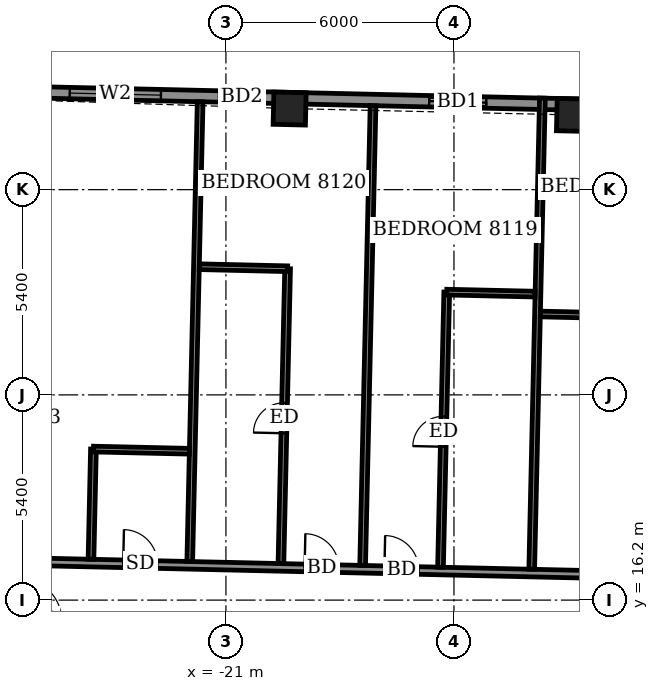
"""IFC4 building model, lengths in metres.
Left out: names, types, materials, properties, quantities, classifications, styles, units other than length and angle.
Written with IfcOpenShell. Run it as: python <this file> out.ifc"""

import sys

from ifc_helpers import new_model, si_unit, direction, frame, frame_2d, origin, origin_2d, place, context, subcontext, project, spatial, rectangle, extrude, element, fill, save


model = new_model("IFC4")
c1 = context("Model", 3, precision=1e-05, world=origin(), true_north=direction((0.0, 1.0)))
c2 = subcontext(c1, "Body", "Model", "MODEL_VIEW")
j1 = project(units=[si_unit("LENGTHUNIT", "METRE"), si_unit("PLANEANGLEUNIT", "RADIAN")], contexts=[c1])
p1 = place(None, origin())
s1 = spatial("IfcSite", under=j1, at=p1, CompositionType="ELEMENT")
p2 = place(p1, origin())
s2 = spatial("IfcBuilding", under=s1, at=p2, CompositionType="ELEMENT")
p3 = place(p2, frame((0.0, 0.0, 316.9)))
s3 = spatial("IfcBuildingStorey", under=s2, at=p3, CompositionType="ELEMENT", Elevation=316.9)
for number, where, z_axis, x_axis in (
    (1, (-11.869, 28.965, -0.55), (0.0, 0.0, 1.0), (-1.0, 0.023, 0.0)),
    (2, (-19.324, 29.134, -0.55), (0.0, 0.0, 1.0), (-1.0, 0.023, 0.0)),
):
    element("IfcColumn", number, at=place(p3, frame(where, z_axis=z_axis, x_axis=x_axis)), inside=s3, PredefinedType="COLUMN", context=c2, shape_type="SweptSolid", body=[
        extrude(rectangle(XDim=0.85, YDim=0.85, at=origin_2d()), origin(), (0.0, 0.0, 1.0), 3.6),
    ])
p4 = place(p3, frame((25.264, 28.397, 0.0), z_axis=(0.0, 0.0, 1.0), x_axis=(-0.999742391375, 0.022696935658, 0.0)))
e3 = element("IfcWall", 3, at=p4, inside=s3, PredefinedType="SOLIDWALL", context=c2, shape_type="SweptSolid", body=[
    extrude(rectangle(XDim=51.9, YDim=0.3, at=frame_2d((25.95, 0.0))), origin(), (0.0, 0.0, 1.0), 2.45),
])
p5 = place(p4, frame((0.874, 0.0, 0.0)))
e4 = element("IfcOpeningElement", 4, at=p5, cuts=e3, PredefinedType="OPENING", context=c2, shape_type="SweptSolid", body=[
    extrude(rectangle(XDim=1.5, YDim=2.4, at=frame_2d((0.75, 1.2))), frame((0.0, 0.16, 0.0), z_axis=(0.0, -1.0, 0.0), x_axis=(1.0, 0.0, 0.0)), (0.0, 0.0, 1.0), 0.32),
])
p6 = place(p4, frame((4.241, 0.0, 0.0)))
e5 = element("IfcOpeningElement", 5, at=p6, cuts=e3, PredefinedType="OPENING", context=c2, shape_type="SweptSolid", body=[
    extrude(rectangle(XDim=1.5, YDim=2.4, at=frame_2d((0.75, 1.2))), frame((0.0, 0.16, 0.0), z_axis=(0.0, -1.0, 0.0), x_axis=(1.0, 0.0, 0.0)), (0.0, 0.0, 1.0), 0.32),
])
p7 = place(p4, frame((8.691, 0.0, 0.0)))
e6 = element("IfcOpeningElement", 6, at=p7, cuts=e3, PredefinedType="OPENING", context=c2, shape_type="SweptSolid", body=[
    extrude(rectangle(XDim=1.5, YDim=2.4, at=frame_2d((0.75, 1.2))), frame((0.0, 0.16, 0.0), z_axis=(0.0, -1.0, 0.0), x_axis=(1.0, 0.0, 0.0)), (0.0, 0.0, 1.0), 0.32),
])
p8 = place(p4, frame((12.245, 0.0, 0.0)))
e7 = element("IfcOpeningElement", 7, at=p8, cuts=e3, PredefinedType="OPENING", context=c2, shape_type="SweptSolid", body=[
    extrude(rectangle(XDim=1.5, YDim=2.4, at=frame_2d((0.75, 1.2))), frame((0.0, 0.16, 0.0), z_axis=(0.0, -1.0, 0.0), x_axis=(1.0, 0.0, 0.0)), (0.0, 0.0, 1.0), 0.32),
])
p9 = place(p4, frame((17.25, 0.0, 0.0)))
e8 = element("IfcOpeningElement", 8, at=p9, cuts=e3, PredefinedType="OPENING", context=c2, shape_type="SweptSolid", body=[
    extrude(rectangle(XDim=1.5, YDim=2.4, at=frame_2d((0.75, 1.2))), frame((0.0, 0.16, 0.0), z_axis=(0.0, -1.0, 0.0), x_axis=(1.0, 0.0, 0.0)), (0.0, 0.0, 1.0), 0.32),
])
p10 = place(p4, frame((22.874, 0.0, 0.0)))
e9 = element("IfcOpeningElement", 9, at=p10, cuts=e3, PredefinedType="OPENING", context=c2, shape_type="SweptSolid", body=[
    extrude(rectangle(XDim=1.2, YDim=2.4, at=frame_2d((0.6, 1.2))), frame((0.0, 0.16, 0.0), z_axis=(0.0, -1.0, 0.0), x_axis=(1.0, 0.0, 0.0)), (0.0, 0.0, 1.0), 0.32),
])
p11 = place(p4, frame((26.1, 0.0, 0.0)))
e10 = element("IfcOpeningElement", 10, at=p11, cuts=e3, PredefinedType="OPENING", context=c2, shape_type="SweptSolid", body=[
    extrude(rectangle(XDim=1.5, YDim=2.4, at=frame_2d((0.75, 1.2))), frame((0.0, 0.16, 0.0), z_axis=(0.0, -1.0, 0.0), x_axis=(1.0, 0.0, 0.0)), (0.0, 0.0, 1.0), 0.32),
])
p12 = place(p4, frame((30.977, 0.0, 0.0)))
e11 = element("IfcOpeningElement", 11, at=p12, cuts=e3, PredefinedType="OPENING", context=c2, shape_type="SweptSolid", body=[
    extrude(rectangle(XDim=1.5, YDim=2.4, at=frame_2d((0.75, 1.2))), frame((0.0, 0.16, 0.0), z_axis=(0.0, -1.0, 0.0), x_axis=(1.0, 0.0, 0.0)), (0.0, 0.0, 1.0), 0.32),
])
p13 = place(p4, frame((34.53, 0.0, 0.0)))
e12 = element("IfcOpeningElement", 12, at=p13, cuts=e3, PredefinedType="OPENING", context=c2, shape_type="SweptSolid", body=[
    extrude(rectangle(XDim=1.5, YDim=2.4, at=frame_2d((0.75, 1.2))), frame((0.0, 0.16, 0.0), z_axis=(0.0, -1.0, 0.0), x_axis=(1.0, 0.0, 0.0)), (0.0, 0.0, 1.0), 0.32),
])
p14 = place(p4, frame((39.425, 0.0, 0.0)))
e13 = element("IfcOpeningElement", 13, at=p14, cuts=e3, PredefinedType="OPENING", context=c2, shape_type="SweptSolid", body=[
    extrude(rectangle(XDim=1.5, YDim=2.4, at=frame_2d((0.75, 1.2))), frame((0.0, 0.16, 0.0), z_axis=(0.0, -1.0, 0.0), x_axis=(1.0, 0.0, 0.0)), (0.0, 0.0, 1.0), 0.32),
])
p15 = place(p4, frame((45.259, 0.0, 0.0)))
e14 = element("IfcOpeningElement", 14, at=p15, cuts=e3, PredefinedType="OPENING", context=c2, shape_type="SweptSolid", body=[
    extrude(rectangle(XDim=1.2, YDim=2.4, at=frame_2d((0.6, 1.2))), frame((0.0, 0.16, 0.0), z_axis=(0.0, -1.0, 0.0), x_axis=(1.0, 0.0, 0.0)), (0.0, 0.0, 1.0), 0.32),
])
p16 = place(p4, frame((47.987, 0.0, 0.9)))
e15 = element("IfcOpeningElement", 15, at=p16, cuts=e3, PredefinedType="OPENING", context=c2, shape_type="SweptSolid", body=[
    extrude(rectangle(XDim=2.4, YDim=1.5, at=frame_2d((1.2, 0.75))), frame((0.0, 0.16, 0.0), z_axis=(0.0, -1.0, 0.0), x_axis=(1.0, 0.0, 0.0)), (0.0, 0.0, 1.0), 0.32),
])
p17 = place(p3, frame((-30.686, 15.814, 0.0), z_axis=(0.0, 0.0, 1.0), x_axis=(0.999742346277, -0.022698921993, 0.0)))
e16 = element("IfcWall", 16, at=p17, inside=s3, PredefinedType="PARTITIONING", context=c2, shape_type="SweptSolid", body=[
    extrude(rectangle(XDim=11.1, YDim=0.2, at=frame_2d((5.55, 0.0))), origin(), (0.0, 0.0, 1.0), 3.05),
])
p18 = place(p17, frame((4.35, 0.0, 0.0)))
e17 = element("IfcOpeningElement", 17, at=p18, cuts=e16, PredefinedType="OPENING", context=c2, shape_type="SweptSolid", body=[
    extrude(rectangle(XDim=1.0, YDim=2.1, at=frame_2d((0.5, 1.05))), frame((0.0, 0.11, 0.0), z_axis=(0.0, -1.0, 0.0), x_axis=(1.0, 0.0, 0.0)), (0.0, 0.0, 1.0), 0.22),
])
p19 = place(p3, frame((-30.652, 17.313, 0.0), z_axis=(0.0, 0.0, 1.0), x_axis=(0.999742623764, -0.02268669719, 0.0)))
e18 = element("IfcWall", 18, at=p19, inside=s3, PredefinedType="PARTITIONING", context=c2, shape_type="SweptSolid", body=[
    extrude(rectangle(XDim=58.8, YDim=0.2, at=frame_2d((29.4, 0.0))), origin(), (0.0, 0.0, 1.0), 3.05),
])
p20 = place(p19, frame((55.698, 0.0, 0.0)))
e19 = element("IfcOpeningElement", 19, at=p20, cuts=e18, PredefinedType="OPENING", context=c2, shape_type="SweptSolid", body=[
    extrude(rectangle(XDim=1.0, YDim=2.1, at=frame_2d((0.5, 1.05))), frame((0.0, 0.11, 0.0), z_axis=(0.0, -1.0, 0.0), x_axis=(1.0, 0.0, 0.0)), (0.0, 0.0, 1.0), 0.22),
])
p21 = place(p19, frame((49.0, 0.0, 0.0)))
e20 = element("IfcOpeningElement", 20, at=p21, cuts=e18, PredefinedType="OPENING", context=c2, shape_type="SweptSolid", body=[
    extrude(rectangle(XDim=0.9, YDim=2.1, at=frame_2d((0.45, 1.05))), frame((0.0, 0.11, 0.0), z_axis=(0.0, -1.0, 0.0), x_axis=(1.0, 0.0, 0.0)), (0.0, 0.0, 1.0), 0.22),
])
p22 = place(p19, frame((47.125, 0.0, 0.0)))
e21 = element("IfcOpeningElement", 21, at=p22, cuts=e18, PredefinedType="OPENING", context=c2, shape_type="SweptSolid", body=[
    extrude(rectangle(XDim=0.9, YDim=2.1, at=frame_2d((0.45, 1.05))), frame((0.0, 0.11, 0.0), z_axis=(0.0, -1.0, 0.0), x_axis=(1.0, 0.0, 0.0)), (0.0, 0.0, 1.0), 0.22),
])
p23 = place(p19, frame((40.425, 0.0, 0.0)))
e22 = element("IfcOpeningElement", 22, at=p23, cuts=e18, PredefinedType="OPENING", context=c2, shape_type="SweptSolid", body=[
    extrude(rectangle(XDim=0.9, YDim=2.1, at=frame_2d((0.45, 1.05))), frame((0.0, 0.11, 0.0), z_axis=(0.0, -1.0, 0.0), x_axis=(1.0, 0.0, 0.0)), (0.0, 0.0, 1.0), 0.22),
])
p24 = place(p19, frame((38.4, 0.0, 0.0)))
e23 = element("IfcOpeningElement", 23, at=p24, cuts=e18, PredefinedType="OPENING", context=c2, shape_type="SweptSolid", body=[
    extrude(rectangle(XDim=0.9, YDim=2.1, at=frame_2d((0.45, 1.05))), frame((0.0, 0.11, 0.0), z_axis=(0.0, -1.0, 0.0), x_axis=(1.0, 0.0, 0.0)), (0.0, 0.0, 1.0), 0.22),
])
p25 = place(p19, frame((31.6, 0.0, 0.0)))
e24 = element("IfcOpeningElement", 24, at=p25, cuts=e18, PredefinedType="OPENING", context=c2, shape_type="SweptSolid", body=[
    extrude(rectangle(XDim=0.9, YDim=2.1, at=frame_2d((0.45, 1.05))), frame((0.0, 0.11, 0.0), z_axis=(0.0, -1.0, 0.0), x_axis=(1.0, 0.0, 0.0)), (0.0, 0.0, 1.0), 0.22),
])
p26 = place(p19, frame((29.55, 0.0, 0.0)))
e25 = element("IfcOpeningElement", 25, at=p26, cuts=e18, PredefinedType="OPENING", context=c2, shape_type="SweptSolid", body=[
    extrude(rectangle(XDim=0.9, YDim=2.1, at=frame_2d((0.45, 1.05))), frame((0.0, 0.11, 0.0), z_axis=(0.0, -1.0, 0.0), x_axis=(1.0, 0.0, 0.0)), (0.0, 0.0, 1.0), 0.22),
])
p27 = place(p19, frame((22.625, 0.0, 0.0)))
e26 = element("IfcOpeningElement", 26, at=p27, cuts=e18, PredefinedType="OPENING", context=c2, shape_type="SweptSolid", body=[
    extrude(rectangle(XDim=0.9, YDim=2.1, at=frame_2d((0.45, 1.05))), frame((0.0, 0.11, 0.0), z_axis=(0.0, -1.0, 0.0), x_axis=(1.0, 0.0, 0.0)), (0.0, 0.0, 1.0), 0.22),
])
p28 = place(p19, frame((20.625, 0.0, 0.0)))
e27 = element("IfcOpeningElement", 27, at=p28, cuts=e18, PredefinedType="OPENING", context=c2, shape_type="SweptSolid", body=[
    extrude(rectangle(XDim=0.9, YDim=2.1, at=frame_2d((0.45, 1.05))), frame((0.0, 0.11, 0.0), z_axis=(0.0, -1.0, 0.0), x_axis=(1.0, 0.0, 0.0)), (0.0, 0.0, 1.0), 0.22),
])
p29 = place(p19, frame((13.825, 0.0, 0.0)))
e28 = element("IfcOpeningElement", 28, at=p29, cuts=e18, PredefinedType="OPENING", context=c2, shape_type="SweptSolid", body=[
    extrude(rectangle(XDim=0.9, YDim=2.1, at=frame_2d((0.45, 1.05))), frame((0.0, 0.11, 0.0), z_axis=(0.0, -1.0, 0.0), x_axis=(1.0, 0.0, 0.0)), (0.0, 0.0, 1.0), 0.22),
])
p30 = place(p19, frame((11.725, 0.0, 0.0)))
e29 = element("IfcOpeningElement", 29, at=p30, cuts=e18, PredefinedType="OPENING", context=c2, shape_type="SweptSolid", body=[
    extrude(rectangle(XDim=0.9, YDim=2.1, at=frame_2d((0.45, 1.05))), frame((0.0, 0.11, 0.0), z_axis=(0.0, -1.0, 0.0), x_axis=(1.0, 0.0, 0.0)), (0.0, 0.0, 1.0), 0.22),
])
p31 = place(p19, frame((1.85, 0.0, 0.0)))
e30 = element("IfcOpeningElement", 30, at=p31, cuts=e18, PredefinedType="OPENING", context=c2, shape_type="SweptSolid", body=[
    extrude(rectangle(XDim=1.0, YDim=2.1, at=frame_2d((0.5, 1.05))), frame((0.0, 0.11, 0.0), z_axis=(0.0, -1.0, 0.0), x_axis=(1.0, 0.0, 0.0)), (0.0, 0.0, 1.0), 0.22),
])
p32 = place(p19, frame((6.95, 0.0, 0.0)))
e31 = element("IfcOpeningElement", 31, at=p32, cuts=e18, PredefinedType="OPENING", context=c2, shape_type="SweptSolid", body=[
    extrude(rectangle(XDim=0.9, YDim=2.1, at=frame_2d((0.45, 1.05))), frame((0.0, 0.11, 0.0), z_axis=(0.0, -1.0, 0.0), x_axis=(1.0, 0.0, 0.0)), (0.0, 0.0, 1.0), 0.22),
])
p33 = place(p3, frame((-24.551, 17.275, 0.0), z_axis=(0.0, 0.0, 1.0), x_axis=(0.022394382402, 0.999749214372, 0.0)))
e32 = element("IfcWall", 32, at=p33, inside=s3, PredefinedType="PARTITIONING", context=c2, shape_type="SweptSolid", body=[
    extrude(rectangle(XDim=2.9, YDim=0.15, at=frame_2d((1.45, 0.0))), origin(), (0.0, 0.0, 1.0), 3.05),
])
p34 = place(p3, frame((-21.952, 17.216, 0.0), z_axis=(0.0, 0.0, 1.0), x_axis=(0.02263844782, 0.9997437175, 0.0)))
e33 = element("IfcWall", 33, at=p34, inside=s3, PredefinedType="PARTITIONING", context=c2, shape_type="SweptSolid", body=[
    extrude(rectangle(XDim=12.1, YDim=0.15, at=frame_2d((6.05, 0.0))), origin(), (0.0, 0.0, 1.0), 2.5),
])
p35 = place(p3, frame((-19.553, 17.161, 0.0), z_axis=(0.0, 0.0, 1.0), x_axis=(0.022683528451, 0.999742695666, 0.0)))
e34 = element("IfcWall", 34, at=p35, inside=s3, PredefinedType="PARTITIONING", context=c2, shape_type="SweptSolid", body=[
    extrude(rectangle(XDim=7.76, YDim=0.15, at=frame_2d((3.88, 0.0))), origin(), (0.0, 0.0, 1.0), 3.05),
])
p36 = place(p35, frame((3.43, 0.0, 0.0)))
e35 = element("IfcOpeningElement", 35, at=p36, cuts=e34, PredefinedType="OPENING", context=c2, shape_type="SweptSolid", body=[
    extrude(rectangle(XDim=0.8, YDim=2.1, at=frame_2d((0.4, 1.05))), frame((0.0, 0.085, 0.0), z_axis=(0.0, -1.0, 0.0), x_axis=(1.0, 0.0, 0.0)), (0.0, 0.0, 1.0), 0.17),
])
p37 = place(p3, frame((-17.403, 17.113, 0.0), z_axis=(0.0, 0.0, 1.0), x_axis=(0.022660442732, 0.999743219199, 0.0)))
e36 = element("IfcWall", 36, at=p37, inside=s3, PredefinedType="PARTITIONING", context=c2, shape_type="SweptSolid", body=[
    extrude(rectangle(XDim=12.099, YDim=0.15, at=frame_2d((6.05, 0.0))), origin(), (0.0, 0.0, 1.0), 2.45),
])
p38 = place(p3, frame((-15.354, 17.066, 0.0), z_axis=(0.0, 0.0, 1.0), x_axis=(0.022660891034, 0.999743209038, 0.0)))
e37 = element("IfcWall", 37, at=p38, inside=s3, PredefinedType="PARTITIONING", context=c2, shape_type="SweptSolid", body=[
    extrude(rectangle(XDim=7.24, YDim=0.15, at=frame_2d((3.62, 0.0))), origin(), (0.0, 0.0, 1.0), 3.05),
])
p39 = place(p38, frame((3.17, 0.0, 0.0)))
e38 = element("IfcOpeningElement", 38, at=p39, cuts=e37, PredefinedType="OPENING", context=c2, shape_type="SweptSolid", body=[
    extrude(rectangle(XDim=0.8, YDim=2.1, at=frame_2d((0.4, 1.05))), frame((0.0, 0.085, 0.0), z_axis=(0.0, -1.0, 0.0), x_axis=(1.0, 0.0, 0.0)), (0.0, 0.0, 1.0), 0.17),
])
p40 = place(p3, frame((-12.954, 17.012, 0.0), z_axis=(0.0, 0.0, 1.0), x_axis=(0.022663260168, 0.999743155335, 0.0)))
e39 = element("IfcWall", 39, at=p40, inside=s3, PredefinedType="PARTITIONING", context=c2, shape_type="SweptSolid", body=[
    extrude(rectangle(XDim=12.399, YDim=0.15, at=frame_2d((6.2, 0.0))), origin(), (0.0, 0.0, 1.0), 2.45),
])
p41 = place(p3, frame((-24.486, 20.174, 0.0), z_axis=(0.0, 0.0, 1.0), x_axis=(0.999744175585, -0.022618209135, 0.0)))
e40 = element("IfcWall", 40, at=p41, inside=s3, PredefinedType="PARTITIONING", context=c2, shape_type="SweptSolid", body=[
    extrude(rectangle(XDim=2.526, YDim=0.15, at=frame_2d((1.263, 0.0))), origin(), (0.0, 0.0, 1.0), 3.05),
])
p42 = place(p3, frame((-12.727, 23.728, 0.0), z_axis=(0.0, 0.0, 1.0), x_axis=(0.999740260747, -0.02279059109, 0.0)))
e41 = element("IfcWall", 41, at=p42, inside=s3, PredefinedType="PARTITIONING", context=c2, shape_type="SweptSolid", body=[
    extrude(rectangle(XDim=2.324, YDim=0.15, at=frame_2d((1.162, 0.0))), origin(), (0.0, 0.0, 1.0), 3.05),
])
p43 = place(p3, frame((-15.19, 24.304, 0.0), z_axis=(0.0, 0.0, 1.0), x_axis=(0.999740478815, -0.022781023197, 0.0)))
e42 = element("IfcWall", 42, at=p43, inside=s3, PredefinedType="PARTITIONING", context=c2, shape_type="SweptSolid", body=[
    extrude(rectangle(XDim=2.325, YDim=0.15, at=frame_2d((1.163, 0.0))), origin(), (0.0, 0.0, 1.0), 3.05),
])
p44 = place(p3, frame((-21.701, 24.972, 0.0), z_axis=(0.0, 0.0, 1.0), x_axis=(0.999740260747, -0.02279059109, 0.0)))
e43 = element("IfcWall", 43, at=p44, inside=s3, PredefinedType="PARTITIONING", context=c2, shape_type="SweptSolid", body=[
    extrude(rectangle(XDim=2.324, YDim=0.15, at=frame_2d((1.162, 0.0))), origin(), (0.0, 0.0, 1.0), 3.05),
])
p45 = place(p14, origin())
e44 = element("IfcDoor", 44, at=p45, inside=s3, OperationType="SLIDING_TO_LEFT", PredefinedType="DOOR", context=c2, shape_type="SweptSolid", body=[
    extrude(rectangle(XDim=1.5, YDim=2.4, at=frame_2d((0.75, 1.2))), frame((0.0, 0.025, 0.0), z_axis=(0.0, -1.0, 0.0), x_axis=(1.0, 0.0, 0.0)), (0.0, 0.0, 1.0), 0.05),
])
fill(e13, e44)
p46 = place(p15, origin())
e45 = element("IfcDoor", 45, at=p46, inside=s3, OperationType="SLIDING_TO_LEFT", PredefinedType="DOOR", context=c2, shape_type="SweptSolid", body=[
    extrude(rectangle(XDim=1.2, YDim=2.4, at=frame_2d((0.6, 1.2))), frame((0.0, 0.025, 0.0), z_axis=(0.0, -1.0, 0.0), x_axis=(1.0, 0.0, 0.0)), (0.0, 0.0, 1.0), 0.05),
])
fill(e14, e45)
p47 = place(p16, origin())
e46 = element("IfcWindow", 46, at=p47, inside=s3, PartitioningType="DOUBLE_PANEL_VERTICAL", PredefinedType="WINDOW", context=c2, shape_type="SweptSolid", body=[
    extrude(rectangle(XDim=2.4, YDim=1.5, at=frame_2d((1.2, 0.75))), frame((0.0, 0.03, 0.0), z_axis=(0.0, -1.0, 0.0), x_axis=(1.0, 0.0, 0.0)), (0.0, 0.0, 1.0), 0.06),
])
fill(e15, e46)
p48 = place(p29, origin())
e47 = element("IfcDoor", 47, at=p48, inside=s3, OperationType="SINGLE_SWING_LEFT", PredefinedType="DOOR", context=c2, shape_type="SweptSolid", body=[
    extrude(rectangle(XDim=0.9, YDim=2.1, at=frame_2d((0.45, 1.05))), frame((0.0, 0.025, 0.0), z_axis=(0.0, -1.0, 0.0), x_axis=(1.0, 0.0, 0.0)), (0.0, 0.0, 1.0), 0.05),
])
fill(e28, e47)
p49 = place(p39, origin())
e48 = element("IfcDoor", 48, at=p49, inside=s3, OperationType="SINGLE_SWING_LEFT", PredefinedType="DOOR", context=c2, shape_type="SweptSolid", body=[
    extrude(rectangle(XDim=0.8, YDim=2.1, at=frame_2d((0.4, 1.05))), frame((0.0, 0.025, 0.0), z_axis=(0.0, -1.0, 0.0), x_axis=(1.0, 0.0, 0.0)), (0.0, 0.0, 1.0), 0.05),
])
fill(e38, e48)
p50 = place(p30, origin())
e49 = element("IfcDoor", 49, at=p50, inside=s3, OperationType="SINGLE_SWING_RIGHT", PredefinedType="DOOR", context=c2, shape_type="SweptSolid", body=[
    extrude(rectangle(XDim=0.9, YDim=2.1, at=frame_2d((0.45, 1.05))), frame((0.0, 0.025, 0.0), z_axis=(0.0, -1.0, 0.0), x_axis=(1.0, 0.0, 0.0)), (0.0, 0.0, 1.0), 0.05),
])
fill(e29, e49)
p51 = place(p36, origin())
e50 = element("IfcDoor", 50, at=p51, inside=s3, OperationType="SINGLE_SWING_RIGHT", PredefinedType="DOOR", context=c2, shape_type="SweptSolid", body=[
    extrude(rectangle(XDim=0.8, YDim=2.1, at=frame_2d((0.4, 1.05))), frame((0.0, 0.025, 0.0), z_axis=(0.0, -1.0, 0.0), x_axis=(1.0, 0.0, 0.0)), (0.0, 0.0, 1.0), 0.05),
])
fill(e35, e50)
p52 = place(p32, origin())
e51 = element("IfcDoor", 51, at=p52, inside=s3, OperationType="SINGLE_SWING_RIGHT", PredefinedType="DOOR", context=c2, shape_type="SweptSolid", body=[
    extrude(rectangle(XDim=0.9, YDim=2.1, at=frame_2d((0.45, 1.05))), frame((0.0, 0.025, 0.0), z_axis=(0.0, -1.0, 0.0), x_axis=(1.0, 0.0, 0.0)), (0.0, 0.0, 1.0), 0.05),
])
fill(e31, e51)
save(model, sys.argv[1])
